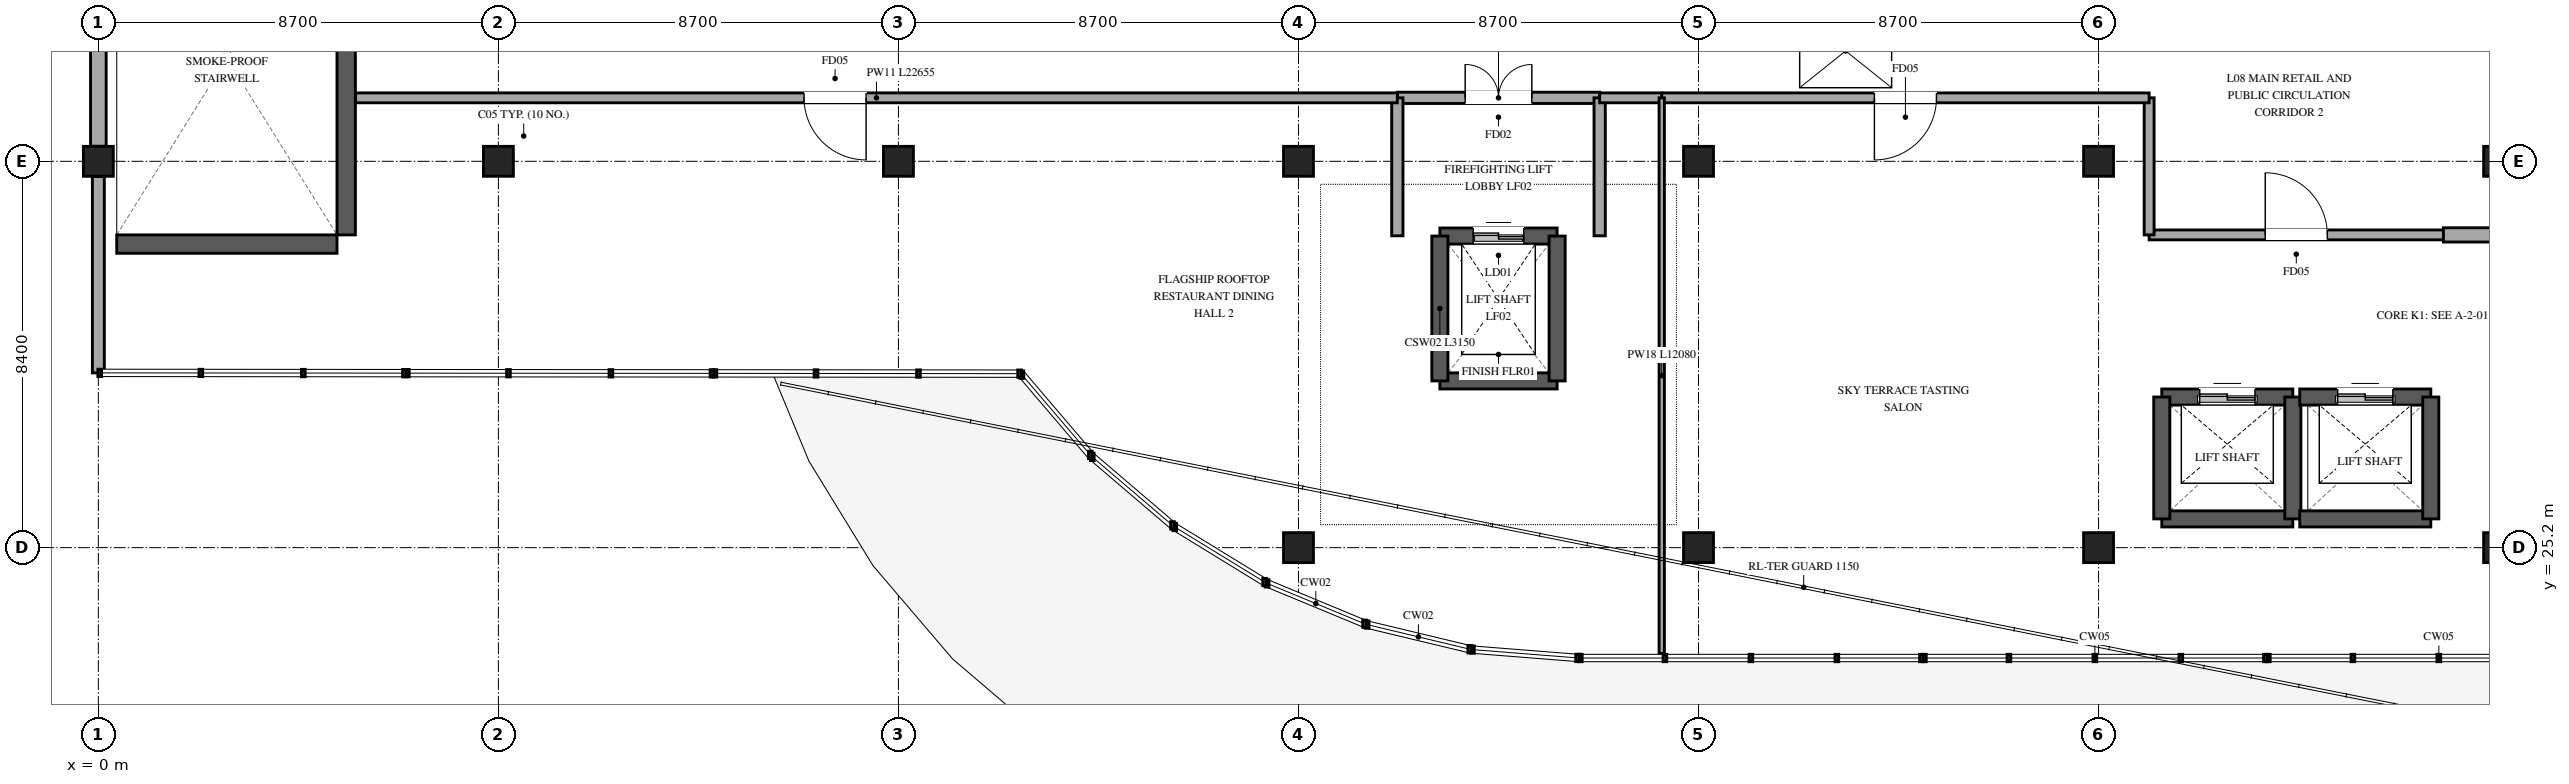
"""IFC4 building model, lengths in metres.
Left out: names, types, materials, properties, quantities, classifications, styles, units other than length and angle.
Written with IfcOpenShell. Run it as: python <this file> out.ifc"""

import sys

from ifc_helpers import new_model, si_unit, direction, frame, frame_2d, origin, origin_2d, place, context, subcontext, project, spatial, rectangle, extrude, element, fill, save


model = new_model("IFC4")
c1 = context("Model", 3, precision=1e-05, world=origin(), true_north=direction((0.0, 1.0)))
c2 = subcontext(c1, "Body", "Model", "MODEL_VIEW")
j1 = project(units=[si_unit("LENGTHUNIT", "METRE"), si_unit("PLANEANGLEUNIT", "RADIAN")], contexts=[c1])
p1 = place(None, origin())
s1 = spatial("IfcSite", under=j1, at=p1, CompositionType="ELEMENT")
p2 = place(p1, origin())
s2 = spatial("IfcBuilding", under=s1, at=p2, CompositionType="ELEMENT")
p3 = place(p2, frame((0.0, 0.0, 36.3)))
s3 = spatial("IfcBuildingStorey", under=s2, at=p3, CompositionType="ELEMENT", Elevation=36.3)
for number, where, z_axis, x_axis in (
    (1, (0.0, 33.6, 0.0), (0.0, 0.0, 1.0), (1.0, 0.0, 0.0)),
    (2, (8.7, 33.6, 0.0), (0.0, 0.0, 1.0), (1.0, 0.0, 0.0)),
    (3, (17.4, 33.6, 0.0), (0.0, 0.0, 1.0), (1.0, 0.0, 0.0)),
    (4, (26.1, 25.2, 0.0), (0.0, 0.0, 1.0), (1.0, 0.0, 0.0)),
    (5, (26.1, 33.6, 0.0), (0.0, 0.0, 1.0), (1.0, 0.0, 0.0)),
    (6, (34.8, 25.2, 0.0), (0.0, 0.0, 1.0), (1.0, 0.0, 0.0)),
    (7, (34.8, 33.6, 0.0), (0.0, 0.0, 1.0), (1.0, 0.0, 0.0)),
    (8, (43.5, 25.2, 0.0), (0.0, 0.0, 1.0), (1.0, 0.0, 0.0)),
    (9, (43.5, 33.6, 0.0), (0.0, 0.0, 1.0), (1.0, 0.0, 0.0)),
    (10, (52.2, 25.2, 0.0), (0.0, 0.0, 1.0), (1.0, 0.0, 0.0)),
    (11, (52.2, 33.6, 0.0), (0.0, 0.0, 1.0), (1.0, 0.0, 0.0)),
):
    element("IfcColumn", number, at=place(p3, frame(where, z_axis=z_axis, x_axis=x_axis)), inside=s3, PredefinedType="COLUMN", context=c2, shape_type="SweptSolid", body=[
        extrude(rectangle(XDim=0.65, YDim=0.65, at=origin_2d()), origin(), (0.0, 0.0, 1.0), 4.8),
    ])
p4 = place(p3, frame((0.0, 29.0, 0.0), z_axis=(0.0, 0.0, 1.0), x_axis=(0.0, 1.0, 0.0)))
e12 = element("IfcWall", 12, at=p4, inside=s3, PredefinedType="STANDARD", context=c2, shape_type="SweptSolid", body=[
    extrude(rectangle(XDim=4.273, YDim=0.26, at=frame_2d((2.136, 0.0))), origin(), (0.0, 0.0, 1.0), 4.49),
])
p5 = place(p3, frame((0.0, 33.927, 0.0), z_axis=(0.0, 0.0, 1.0), x_axis=(0.0, 1.0, 0.0)))
e13 = element("IfcWall", 13, at=p5, inside=s3, PredefinedType="STANDARD", context=c2, shape_type="SweptSolid", body=[
    extrude(rectangle(XDim=7.746, YDim=0.34, at=frame_2d((3.873, 0.0))), origin(), (0.0, 0.0, 1.0), 4.49),
])
p6 = place(p3, frame((5.39, 42.0, 0.0), z_axis=(0.0, 0.0, 1.0), x_axis=(0.0, -1.0, 0.0)))
e14 = element("IfcWall", 14, at=p6, inside=s3, PredefinedType="SHEAR", context=c2, shape_type="SweptSolid", body=[
    extrude(rectangle(XDim=10.0, YDim=0.4, at=frame_2d((5.0, 0.0))), origin(), (0.0, 0.0, 1.0), 4.8),
])
p7 = place(p6, frame((0.41, 0.0, 0.0)))
e15 = element("IfcOpeningElement", 15, at=p7, cuts=e14, PredefinedType="OPENING", context=c2, shape_type="SweptSolid", body=[
    extrude(rectangle(XDim=1.5, YDim=2.2, at=frame_2d((0.75, 1.1))), frame((0.0, 0.21, 0.0), z_axis=(0.0, -1.0, 0.0), x_axis=(1.0, 0.0, 0.0)), (0.0, 0.0, 1.0), 0.42),
])
p8 = place(p3, frame((5.19, 31.8, 0.0), z_axis=(0.0, 0.0, 1.0), x_axis=(-1.0, 0.0, 0.0)))
e16 = element("IfcWall", 16, at=p8, inside=s3, PredefinedType="SHEAR", context=c2, shape_type="SweptSolid", body=[
    extrude(rectangle(XDim=4.79, YDim=0.4, at=frame_2d((2.395, 0.0))), origin(), (0.0, 0.0, 1.0), 4.8),
])
p9 = place(p3, frame((29.175, 31.975, 0.0), z_axis=(0.0, 0.0, 1.0), x_axis=(1.0, 0.0, 0.0)))
e17 = element("IfcWall", 17, at=p9, inside=s3, PredefinedType="SHEAR", context=c2, shape_type="SweptSolid", body=[
    extrude(rectangle(XDim=2.55, YDim=0.35, at=frame_2d((1.275, 0.0))), origin(), (0.0, 0.0, 1.0), 4.8),
])
p10 = place(p9, frame((0.725, 0.0, 0.0)))
e18 = element("IfcOpeningElement", 18, at=p10, cuts=e17, PredefinedType="OPENING", context=c2, shape_type="SweptSolid", body=[
    extrude(rectangle(XDim=1.1, YDim=2.2, at=frame_2d((0.55, 1.1))), frame((0.0, 0.185, 0.0), z_axis=(0.0, -1.0, 0.0), x_axis=(1.0, 0.0, 0.0)), (0.0, 0.0, 1.0), 0.37),
])
p11 = place(p3, frame((31.725, 28.825, 0.0), z_axis=(0.0, 0.0, 1.0), x_axis=(-1.0, 0.0, 0.0)))
e19 = element("IfcWall", 19, at=p11, inside=s3, PredefinedType="SHEAR", context=c2, shape_type="SweptSolid", body=[
    extrude(rectangle(XDim=2.55, YDim=0.35, at=frame_2d((1.275, 0.0))), origin(), (0.0, 0.0, 1.0), 4.8),
])
for number, where, z_axis, x_axis in (
    (20, (29.175, 28.825, 0.0), (0.0, 0.0, 1.0), (0.0, 1.0, 0.0)),
    (21, (31.725, 31.975, 0.0), (0.0, 0.0, 1.0), (0.0, -1.0, 0.0)),
):
    element("IfcWall", number, at=place(p3, frame(where, z_axis=z_axis, x_axis=x_axis)), inside=s3, PredefinedType="SHEAR", context=c2, shape_type="SweptSolid", body=[
        extrude(rectangle(XDim=3.15, YDim=0.35, at=frame_2d((1.575, 0.0))), origin(), (0.0, 0.0, 1.0), 4.8),
    ])
p12 = place(p3, frame((44.875, 28.475, 0.0), z_axis=(0.0, 0.0, 1.0), x_axis=(1.0, 0.0, 0.0)))
e22 = element("IfcWall", 22, at=p12, inside=s3, PredefinedType="SHEAR", context=c2, shape_type="SweptSolid", body=[
    extrude(rectangle(XDim=2.85, YDim=0.35, at=frame_2d((1.425, 0.0))), origin(), (0.0, 0.0, 1.0), 4.8),
])
p13 = place(p12, frame((0.825, 0.0, 0.0)))
e23 = element("IfcOpeningElement", 23, at=p13, cuts=e22, PredefinedType="OPENING", context=c2, shape_type="SweptSolid", body=[
    extrude(rectangle(XDim=1.2, YDim=2.2, at=frame_2d((0.6, 1.1))), frame((0.0, 0.185, 0.0), z_axis=(0.0, -1.0, 0.0), x_axis=(1.0, 0.0, 0.0)), (0.0, 0.0, 1.0), 0.37),
])
p14 = place(p3, frame((47.725, 25.825, 0.0), z_axis=(0.0, 0.0, 1.0), x_axis=(-1.0, 0.0, 0.0)))
e24 = element("IfcWall", 24, at=p14, inside=s3, PredefinedType="SHEAR", context=c2, shape_type="SweptSolid", body=[
    extrude(rectangle(XDim=2.85, YDim=0.35, at=frame_2d((1.425, 0.0))), origin(), (0.0, 0.0, 1.0), 4.8),
])
for number, where, z_axis, x_axis in (
    (25, (44.875, 25.825, 0.0), (0.0, 0.0, 1.0), (0.0, 1.0, 0.0)),
    (26, (47.725, 28.475, 0.0), (0.0, 0.0, 1.0), (0.0, -1.0, 0.0)),
):
    element("IfcWall", number, at=place(p3, frame(where, z_axis=z_axis, x_axis=x_axis)), inside=s3, PredefinedType="SHEAR", context=c2, shape_type="SweptSolid", body=[
        extrude(rectangle(XDim=2.65, YDim=0.35, at=frame_2d((1.325, 0.0))), origin(), (0.0, 0.0, 1.0), 4.8),
    ])
p15 = place(p3, frame((47.875, 28.475, 0.0), z_axis=(0.0, 0.0, 1.0), x_axis=(1.0, 0.0, 0.0)))
e27 = element("IfcWall", 27, at=p15, inside=s3, PredefinedType="SHEAR", context=c2, shape_type="SweptSolid", body=[
    extrude(rectangle(XDim=2.85, YDim=0.35, at=frame_2d((1.425, 0.0))), origin(), (0.0, 0.0, 1.0), 4.8),
])
p16 = place(p15, frame((0.825, 0.0, 0.0)))
e28 = element("IfcOpeningElement", 28, at=p16, cuts=e27, PredefinedType="OPENING", context=c2, shape_type="SweptSolid", body=[
    extrude(rectangle(XDim=1.2, YDim=2.2, at=frame_2d((0.6, 1.1))), frame((0.0, 0.185, 0.0), z_axis=(0.0, -1.0, 0.0), x_axis=(1.0, 0.0, 0.0)), (0.0, 0.0, 1.0), 0.37),
])
p17 = place(p3, frame((50.725, 25.825, 0.0), z_axis=(0.0, 0.0, 1.0), x_axis=(-1.0, 0.0, 0.0)))
e29 = element("IfcWall", 29, at=p17, inside=s3, PredefinedType="SHEAR", context=c2, shape_type="SweptSolid", body=[
    extrude(rectangle(XDim=2.85, YDim=0.35, at=frame_2d((1.425, 0.0))), origin(), (0.0, 0.0, 1.0), 4.8),
])
p18 = place(p3, frame((50.725, 28.475, 0.0), z_axis=(0.0, 0.0, 1.0), x_axis=(0.0, -1.0, 0.0)))
e30 = element("IfcWall", 30, at=p18, inside=s3, PredefinedType="SHEAR", context=c2, shape_type="SweptSolid", body=[
    extrude(rectangle(XDim=2.65, YDim=0.35, at=frame_2d((1.325, 0.0))), origin(), (0.0, 0.0, 1.0), 4.8),
])
p19 = place(p3, frame((28.25, 34.98, 0.0), z_axis=(0.0, 0.0, 1.0), x_axis=(1.0, 0.0, 0.0)))
e31 = element("IfcWall", 31, at=p19, inside=s3, PredefinedType="STANDARD", context=c2, shape_type="SweptSolid", body=[
    extrude(rectangle(XDim=4.4, YDim=0.245, at=frame_2d((2.2, 0.0))), origin(), (0.0, 0.0, 1.0), 4.46),
])
p20 = place(p19, frame((1.475, 0.0, 0.0)))
e32 = element("IfcOpeningElement", 32, at=p20, cuts=e31, PredefinedType="OPENING", context=c2, shape_type="SweptSolid", body=[
    extrude(rectangle(XDim=1.45, YDim=2.2, at=frame_2d((0.725, 1.1))), frame((0.0, 0.133, 0.0), z_axis=(0.0, -1.0, 0.0), x_axis=(1.0, 0.0, 0.0)), (0.0, 0.0, 1.0), 0.265),
])
for number, where, z_axis, x_axis in (
    (33, (28.25, 31.98, 0.0), (0.0, 0.0, 1.0), (0.0, 1.0, 0.0)),
    (34, (32.65, 34.98, 0.0), (0.0, 0.0, 1.0), (0.0, -1.0, 0.0)),
):
    element("IfcWall", number, at=place(p3, frame(where, z_axis=z_axis, x_axis=x_axis)), inside=s3, PredefinedType="STANDARD", context=c2, shape_type="SweptSolid", body=[
        extrude(rectangle(XDim=3.0, YDim=0.245, at=frame_2d((1.5, 0.0))), origin(), (0.0, 0.0, 1.0), 3.8),
    ])
p21 = place(p3, frame((44.6, 32.0, 0.0), z_axis=(0.0, 0.0, 1.0), x_axis=(1.0, 0.0, 0.0)))
e35 = element("IfcWall", 35, at=p21, inside=s3, PredefinedType="PARTITIONING", context=c2, shape_type="SweptSolid", body=[
    extrude(rectangle(XDim=6.4, YDim=0.215, at=frame_2d((3.2, 0.0))), origin(), (0.0, 0.0, 1.0), 4.46),
])
p22 = place(p21, frame((2.525, 0.0, 0.0)))
e36 = element("IfcOpeningElement", 36, at=p22, cuts=e35, PredefinedType="OPENING", context=c2, shape_type="SweptSolid", body=[
    extrude(rectangle(XDim=1.35, YDim=2.2, at=frame_2d((0.675, 1.1))), frame((0.0, 0.118, 0.0), z_axis=(0.0, -1.0, 0.0), x_axis=(1.0, 0.0, 0.0)), (0.0, 0.0, 1.0), 0.235),
])
p23 = place(p3, frame((28.25, 34.98, 0.0), z_axis=(0.0, 0.0, 1.0), x_axis=(-1.0, 0.0, 0.0)))
e37 = element("IfcWall", 37, at=p23, inside=s3, PredefinedType="PARTITIONING", context=c2, shape_type="SweptSolid", body=[
    extrude(rectangle(XDim=22.655, YDim=0.215, at=frame_2d((11.328, 0.0))), origin(), (0.0, 0.0, 1.0), 3.8),
])
p24 = place(p23, frame((11.553, 0.0, 0.0)))
e38 = element("IfcOpeningElement", 38, at=p24, cuts=e37, PredefinedType="OPENING", context=c2, shape_type="SweptSolid", body=[
    extrude(rectangle(XDim=1.35, YDim=2.2, at=frame_2d((0.675, 1.1))), frame((0.0, 0.118, 0.0), z_axis=(0.0, -1.0, 0.0), x_axis=(1.0, 0.0, 0.0)), (0.0, 0.0, 1.0), 0.235),
])
p25 = place(p3, frame((34.0, 34.98, 0.0), z_axis=(0.0, 0.0, 1.0), x_axis=(-1.0, 0.0, 0.0)))
e39 = element("IfcWall", 39, at=p25, inside=s3, PredefinedType="PARTITIONING", context=c2, shape_type="SweptSolid", body=[
    extrude(rectangle(XDim=1.35, YDim=0.215, at=frame_2d((0.675, 0.0))), origin(), (0.0, 0.0, 1.0), 4.46),
])
p26 = place(p3, frame((44.6, 32.0, 0.0), z_axis=(0.0, 0.0, 1.0), x_axis=(0.0, 1.0, 0.0)))
e40 = element("IfcWall", 40, at=p26, inside=s3, PredefinedType="PARTITIONING", context=c2, shape_type="SweptSolid", body=[
    extrude(rectangle(XDim=2.98, YDim=0.215, at=frame_2d((1.49, 0.0))), origin(), (0.0, 0.0, 1.0), 3.8),
])
p27 = place(p3, frame((44.6, 34.98, 0.0), z_axis=(0.0, 0.0, 1.0), x_axis=(-1.0, 0.0, 0.0)))
e41 = element("IfcWall", 41, at=p27, inside=s3, PredefinedType="PARTITIONING", context=c2, shape_type="SweptSolid", body=[
    extrude(rectangle(XDim=10.6, YDim=0.215, at=frame_2d((5.3, 0.0))), origin(), (0.0, 0.0, 1.0), 3.8),
])
p28 = place(p27, frame((4.625, 0.0, 0.0)))
e42 = element("IfcOpeningElement", 42, at=p28, cuts=e41, PredefinedType="OPENING", context=c2, shape_type="SweptSolid", body=[
    extrude(rectangle(XDim=1.35, YDim=2.2, at=frame_2d((0.675, 1.1))), frame((0.0, 0.118, 0.0), z_axis=(0.0, -1.0, 0.0), x_axis=(1.0, 0.0, 0.0)), (0.0, 0.0, 1.0), 0.235),
])
p29 = place(p3, frame((52.8, 32.0, 0.0), z_axis=(0.0, 0.0, 1.0), x_axis=(-1.0, 0.0, 0.0)))
e43 = element("IfcWall", 43, at=p29, inside=s3, PredefinedType="STANDARD", context=c2, shape_type="SweptSolid", body=[
    extrude(rectangle(XDim=1.8, YDim=0.31, at=frame_2d((0.9, 0.0))), origin(), (0.0, 0.0, 1.0), 3.8),
])
p30 = place(p3, frame((34.0, 34.98, 0.0), z_axis=(0.0, 0.0, 1.0), x_axis=(0.0, -1.0, 0.0)))
e44 = element("IfcWall", 44, at=p30, inside=s3, PredefinedType="PARTITIONING", context=c2, shape_type="SweptSolid", body=[
    extrude(rectangle(XDim=12.08, YDim=0.115, at=frame_2d((6.04, 0.0))), origin(), (0.0, 0.0, 1.0), 3.8),
])
p31 = place(p2, frame((0.0, 0.0, 41.1)))
p32 = place(p31, frame((0.0, 0.0, -0.24)))
p33 = place(p32, frame((38.0, 36.0, -0.01)))
p34 = place(p33, frame((0.0, 0.0, 0.2)))
e45 = element("IfcWindow", 45, at=p34, inside=s3, PartitioningType="SINGLE_PANEL", PredefinedType="SKYLIGHT", context=c2, shape_type="SweptSolid", body=[
    extrude(rectangle(XDim=2.0, YDim=1.6, at=origin_2d()), origin(), (0.0, 0.0, 1.0), 0.05),
])
p35 = place(p10, origin())
e46 = element("IfcDoor", 46, at=p35, inside=s3, OperationType="DOUBLE_DOOR_SLIDING", PredefinedType="DOOR", context=c2, shape_type="SweptSolid", body=[
    extrude(rectangle(XDim=1.1, YDim=2.2, at=frame_2d((0.55, 1.1))), frame((0.0, 0.025, 0.0), z_axis=(0.0, -1.0, 0.0), x_axis=(1.0, 0.0, 0.0)), (0.0, 0.0, 1.0), 0.05),
])
fill(e18, e46)
p36 = place(p13, origin())
e47 = element("IfcDoor", 47, at=p36, inside=s3, OperationType="DOUBLE_DOOR_SLIDING", PredefinedType="DOOR", context=c2, shape_type="SweptSolid", body=[
    extrude(rectangle(XDim=1.2, YDim=2.2, at=frame_2d((0.6, 1.1))), frame((0.0, 0.025, 0.0), z_axis=(0.0, -1.0, 0.0), x_axis=(1.0, 0.0, 0.0)), (0.0, 0.0, 1.0), 0.05),
])
fill(e23, e47)
p37 = place(p16, origin())
e48 = element("IfcDoor", 48, at=p37, inside=s3, OperationType="DOUBLE_DOOR_SLIDING", PredefinedType="DOOR", context=c2, shape_type="SweptSolid", body=[
    extrude(rectangle(XDim=1.2, YDim=2.2, at=frame_2d((0.6, 1.1))), frame((0.0, 0.025, 0.0), z_axis=(0.0, -1.0, 0.0), x_axis=(1.0, 0.0, 0.0)), (0.0, 0.0, 1.0), 0.05),
])
fill(e28, e48)
p38 = place(p20, origin())
e49 = element("IfcDoor", 49, at=p38, inside=s3, OperationType="DOUBLE_DOOR_SINGLE_SWING", PredefinedType="DOOR", context=c2, shape_type="SweptSolid", body=[
    extrude(rectangle(XDim=1.45, YDim=2.2, at=frame_2d((0.725, 1.1))), frame((0.0, 0.025, 0.0), z_axis=(0.0, -1.0, 0.0), x_axis=(1.0, 0.0, 0.0)), (0.0, 0.0, 1.0), 0.05),
])
fill(e32, e49)
p39 = place(p22, origin())
e50 = element("IfcDoor", 50, at=p39, inside=s3, OperationType="SINGLE_SWING_LEFT", PredefinedType="DOOR", context=c2, shape_type="SweptSolid", body=[
    extrude(rectangle(XDim=1.35, YDim=2.2, at=frame_2d((0.675, 1.1))), frame((0.0, 0.025, 0.0), z_axis=(0.0, -1.0, 0.0), x_axis=(1.0, 0.0, 0.0)), (0.0, 0.0, 1.0), 0.05),
])
fill(e36, e50)
p40 = place(p24, origin())
e51 = element("IfcDoor", 51, at=p40, inside=s3, OperationType="SINGLE_SWING_LEFT", PredefinedType="DOOR", context=c2, shape_type="SweptSolid", body=[
    extrude(rectangle(XDim=1.35, YDim=2.2, at=frame_2d((0.675, 1.1))), frame((0.0, 0.025, 0.0), z_axis=(0.0, -1.0, 0.0), x_axis=(1.0, 0.0, 0.0)), (0.0, 0.0, 1.0), 0.05),
])
fill(e38, e51)
p41 = place(p28, origin())
e52 = element("IfcDoor", 52, at=p41, inside=s3, OperationType="SINGLE_SWING_RIGHT", PredefinedType="DOOR", context=c2, shape_type="SweptSolid", body=[
    extrude(rectangle(XDim=1.35, YDim=2.2, at=frame_2d((0.675, 1.1))), frame((0.0, 0.025, 0.0), z_axis=(0.0, -1.0, 0.0), x_axis=(1.0, 0.0, 0.0)), (0.0, 0.0, 1.0), 0.05),
])
fill(e42, e52)
save(model, sys.argv[1])
